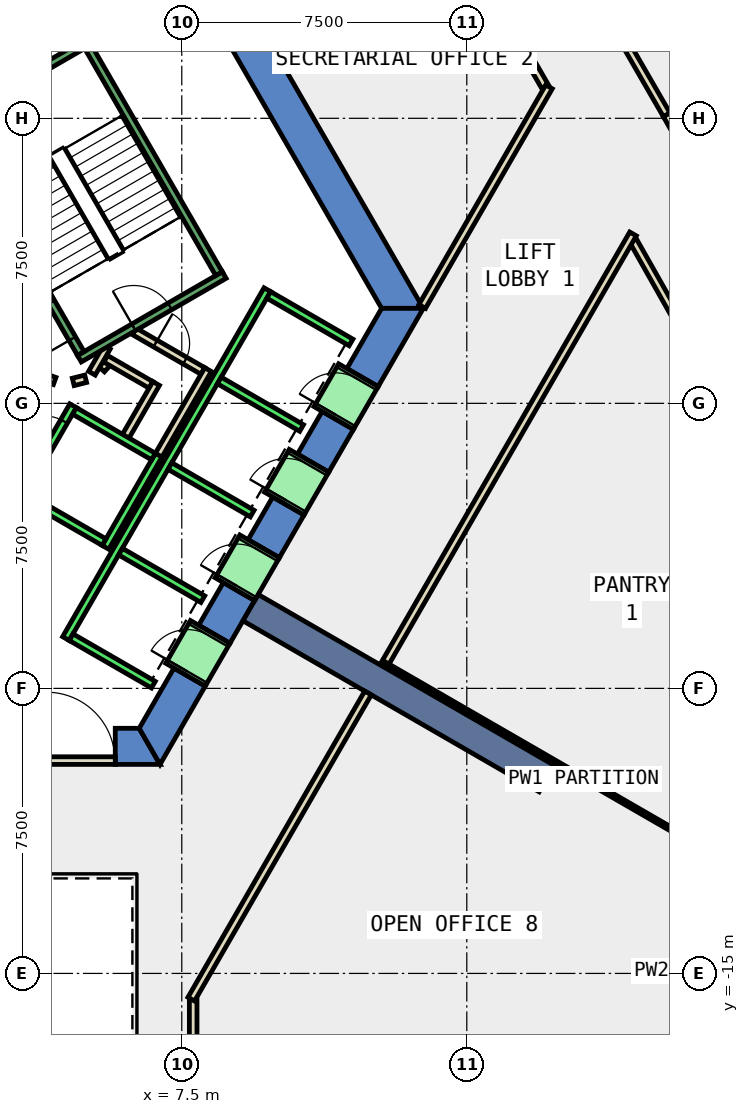
"""IFC4 building model, lengths in metres.
Left out: names, types, materials, properties, quantities, classifications, styles, units other than length and angle.
Written with IfcOpenShell. Run it as: python <this file> out.ifc"""

import sys

from ifc_helpers import new_model, si_unit, direction, frame, frame_2d, origin, place, context, subcontext, project, spatial, polyline, rectangle, outline, extrude, element, fill, save


model = new_model("IFC4")
c1 = context("Model", 3, precision=1e-05, world=origin(), true_north=direction((0.0, 1.0)))
c2 = subcontext(c1, "Body", "Model", "MODEL_VIEW")
j1 = project(units=[si_unit("LENGTHUNIT", "METRE"), si_unit("PLANEANGLEUNIT", "RADIAN")], contexts=[c1])
p1 = place(None, origin())
s1 = spatial("IfcSite", under=j1, at=p1, CompositionType="ELEMENT")
p2 = place(p1, origin())
s2 = spatial("IfcBuilding", under=s1, at=p2, CompositionType="ELEMENT")
p3 = place(p2, frame((0.0, 0.0, 77.0)))
s3 = spatial("IfcBuildingStorey", under=s2, at=p3, CompositionType="ELEMENT", Elevation=77.0)
p4 = place(p3, frame((0.0, 0.0, -0.4)))
e1 = element("IfcWall", 1, at=p4, inside=s3, PredefinedType="SHEAR", context=c2, shape_type="SweptSolid", body=[
    extrude(outline(polyline([(8.517, 11.748), (7.694, 11.273), (12.759, 2.5), (13.856, 2.5), (8.517, 11.748)])), origin(), (0.0, 0.0, 1.0), 4.0),
])
p5 = place(p3, frame((0.0, 0.0, -0.4)))
e2 = element("IfcWall", 2, at=p5, inside=s3, PredefinedType="SHEAR", context=c2, shape_type="SweptSolid", body=[
    extrude(outline(polyline([(5.75, -8.55), (5.75, -9.5), (6.928, -9.5), (6.38, -8.55), (5.75, -8.55)])), origin(), (0.0, 0.0, 1.0), 4.0),
])
p6 = place(p3, frame((0.0, 0.0, -0.4)))
e3 = element("IfcWall", 3, at=p6, inside=s3, PredefinedType="SHEAR", context=c2, shape_type="SweptSolid", body=[
    extrude(outline(polyline([(8.117, -7.44), (7.295, -6.965), (6.38, -8.55), (6.928, -9.5), (8.117, -7.44)])), origin(), (0.0, 0.0, 1.0), 4.0),
])
p7 = place(p3, frame((0.0, 0.0, -0.4)))
e4 = element("IfcWall", 4, at=p7, inside=s3, PredefinedType="SHEAR", context=c2, shape_type="SweptSolid", body=[
    extrude(outline(polyline([(9.417, -5.189), (8.594, -4.714), (7.945, -5.839), (8.767, -6.314), (9.417, -5.189)])), origin(), (0.0, 0.0, 1.0), 4.0),
])
p8 = place(p3, frame((0.0, 0.0, -0.4)))
e5 = element("IfcWall", 5, at=p8, inside=s3, PredefinedType="SHEAR", context=c2, shape_type="SweptSolid", body=[
    extrude(outline(polyline([(10.717, -2.937), (9.894, -2.462), (9.244, -3.588), (10.067, -4.063), (10.717, -2.937)])), origin(), (0.0, 0.0, 1.0), 4.0),
])
p9 = place(p3, frame((0.0, 0.0, -0.4)))
e6 = element("IfcWall", 6, at=p9, inside=s3, PredefinedType="SHEAR", context=c2, shape_type="SweptSolid", body=[
    extrude(outline(polyline([(12.017, -0.686), (11.194, -0.211), (10.544, -1.336), (11.367, -1.811), (12.017, -0.686)])), origin(), (0.0, 0.0, 1.0), 4.0),
])
p10 = place(p3, frame((0.0, 0.0, -0.4)))
e7 = element("IfcWall", 7, at=p10, inside=s3, PredefinedType="SHEAR", context=c2, shape_type="SweptSolid", body=[
    extrude(outline(polyline([(11.844, 0.915), (12.667, 0.44), (13.856, 2.5), (12.759, 2.5), (11.844, 0.915)])), origin(), (0.0, 0.0, 1.0), 4.0),
])
p11 = place(p3, frame((9.31, -5.375, -0.4), z_axis=(0.0, 0.0, 1.0), x_axis=(0.866017533419, -0.500013631625, 0.0)))
e8 = element("IfcWall", 8, at=p11, inside=s3, PredefinedType="SHEAR", context=c2, shape_type="SweptSolid", body=[
    extrude(rectangle(XDim=9.0, YDim=0.8, at=frame_2d((4.5, 0.0))), origin(), (0.0, 0.0, 1.0), 4.0),
])
p12 = place(p3, frame((17.063, 8.328, 0.0), z_axis=(0.0, 0.0, 1.0), x_axis=(-0.499986575203, 0.866033154456, 0.0)))
e9 = element("IfcWall", 9, at=p12, inside=s3, PredefinedType="PARTITIONING", context=c2, shape_type="SweptSolid", body=[
    extrude(rectangle(XDim=4.934, YDim=0.2, at=frame_2d((2.467, 0.0))), origin(), (0.0, 0.0, 1.0), 3.6),
])
p13 = place(p3, frame((21.77, 0.046, 0.0), z_axis=(0.0, 0.0, 1.0), x_axis=(-0.492148137455, 0.870511465059, 0.0)))
e10 = element("IfcWall", 10, at=p13, inside=s3, PredefinedType="PARTITIONING", context=c2, shape_type="SweptSolid", body=[
    extrude(rectangle(XDim=4.868, YDim=0.2, at=frame_2d((2.434, 0.0))), origin(), (0.0, 0.0, 1.0), 3.6),
])
p14 = place(p3, frame((20.259, 7.596, 0.0), z_axis=(0.0, 0.0, 1.0), x_axis=(0.492021755503, -0.870582903641, 0.0)))
e11 = element("IfcWall", 11, at=p14, inside=s3, PredefinedType="PARTITIONING", context=c2, shape_type="SweptSolid", body=[
    extrude(rectangle(XDim=7.251, YDim=0.2, at=frame_2d((3.626, 0.0))), origin(), (0.0, 0.0, 1.0), 3.6),
])
p15 = place(p14, frame((3.201, 0.0, 0.0)))
e12 = element("IfcOpeningElement", 12, at=p15, cuts=e11, PredefinedType="OPENING", context=c2, shape_type="SweptSolid", body=[
    extrude(rectangle(XDim=1.0, YDim=2.1, at=frame_2d((0.5, 1.05))), frame((0.0, 0.11, 0.0), z_axis=(0.0, -1.0, 0.0), x_axis=(1.0, 0.0, 0.0)), (0.0, 0.0, 1.0), 0.22),
])
p16 = place(p3, frame((16.669, 13.811, 0.0), z_axis=(0.0, 0.0, 1.0), x_axis=(0.500027672765, -0.866009426316, 0.0)))
e13 = element("IfcWall", 13, at=p16, inside=s3, PredefinedType="PARTITIONING", context=c2, shape_type="SweptSolid", body=[
    extrude(rectangle(XDim=7.178, YDim=0.2, at=frame_2d((3.589, 0.0))), origin(), (0.0, 0.0, 1.0), 3.6),
])
p17 = place(p16, frame((3.164, 0.0, 0.0)))
e14 = element("IfcOpeningElement", 14, at=p17, cuts=e13, PredefinedType="OPENING", context=c2, shape_type="SweptSolid", body=[
    extrude(rectangle(XDim=1.0, YDim=2.1, at=frame_2d((0.5, 1.05))), frame((0.0, 0.11, 0.0), z_axis=(0.0, -1.0, 0.0), x_axis=(1.0, 0.0, 0.0)), (0.0, 0.0, 1.0), 0.22),
])
p18 = place(p3, frame((5.39, 0.898, 0.0), z_axis=(0.0, 0.0, 1.0), x_axis=(0.673828488714, 0.738887791073, 0.0)))
e15 = element("IfcWall", 15, at=p18, inside=s3, PredefinedType="PARTITIONING", context=c2, shape_type="SweptSolid", body=[
    extrude(rectangle(XDim=0.263, YDim=0.2, at=frame_2d((0.131, 0.0))), origin(), (0.0, 0.0, 1.0), 3.6),
])
p19 = place(p3, frame((5.499, 1.172, 0.0), z_axis=(0.0, 0.0, 1.0), x_axis=(0.866333505267, -0.499465972466, 0.0)))
e16 = element("IfcWall", 16, at=p19, inside=s3, PredefinedType="PARTITIONING", context=c2, shape_type="SweptSolid", body=[
    extrude(rectangle(XDim=1.374, YDim=0.2, at=frame_2d((0.687, 0.0))), origin(), (0.0, 0.0, 1.0), 3.6),
])
p20 = place(p3, frame((6.826, 0.522, 0.0), z_axis=(0.0, 0.0, 1.0), x_axis=(-0.500016722714, -0.866015748706, 0.0)))
e17 = element("IfcWall", 17, at=p20, inside=s3, PredefinedType="PARTITIONING", context=c2, shape_type="SweptSolid", body=[
    extrude(rectangle(XDim=1.7, YDim=0.2, at=frame_2d((0.85, 0.0))), origin(), (0.0, 0.0, 1.0), 3.6),
])
p21 = place(p3, frame((6.25, 1.894, 0.0), z_axis=(0.0, 0.0, 1.0), x_axis=(0.866043184279, -0.499969202016, 0.0)))
e18 = element("IfcWall", 18, at=p21, inside=s3, PredefinedType="PARTITIONING", context=c2, shape_type="SweptSolid", body=[
    extrude(rectangle(XDim=2.084, YDim=0.2, at=frame_2d((1.042, 0.0))), origin(), (0.0, 0.0, 1.0), 3.6),
])
p22 = place(p21, frame((0.642, 0.0, 0.0)))
e19 = element("IfcOpeningElement", 19, at=p22, cuts=e18, PredefinedType="OPENING", context=c2, shape_type="SweptSolid", body=[
    extrude(rectangle(XDim=0.9, YDim=2.1, at=frame_2d((0.45, 1.05))), frame((0.0, 0.11, 0.0), z_axis=(0.0, -1.0, 0.0), x_axis=(1.0, 0.0, 0.0)), (0.0, 0.0, 1.0), 0.22),
])
p23 = place(p3, frame((8.192, 0.888, 0.0), z_axis=(0.0, 0.0, 1.0), x_axis=(-0.499940625693, -0.866059680843, 0.0)))
e20 = element("IfcWall", 20, at=p23, inside=s3, PredefinedType="PARTITIONING", context=c2, shape_type="SweptSolid", body=[
    extrude(rectangle(XDim=2.68, YDim=0.2, at=frame_2d((1.34, 0.0))), origin(), (0.0, 0.0, 1.0), 3.6),
])
p24 = place(p3, frame((5.135, 0.793, 0.0), z_axis=(0.0, 0.0, 1.0), x_axis=(0.499526442893, 0.866298639529, 0.0)))
e21 = element("IfcWall", 21, at=p24, inside=s3, PredefinedType="PARTITIONING", context=c2, shape_type="SweptSolid", body=[
    extrude(rectangle(XDim=0.791, YDim=0.2, at=frame_2d((0.396, 0.0))), origin(), (0.0, 0.0, 1.0), 3.6),
])
p25 = place(p3, frame((13.827, 2.55, 0.0), z_axis=(0.0, 0.0, 1.0), x_axis=(0.500039204794, 0.866002767703, 0.0)))
e22 = element("IfcWall", 22, at=p25, inside=s3, PredefinedType="PARTITIONING", context=c2, shape_type="SweptSolid", body=[
    extrude(rectangle(XDim=6.672, YDim=0.2, at=frame_2d((3.336, 0.0))), origin(), (0.0, 0.0, 1.0), 3.6),
])
p26 = place(p3, frame((3.838, 0.702, 0.0), z_axis=(0.0, 0.0, 1.0), x_axis=(0.941035081519, -0.338308993895, 0.0)))
e23 = element("IfcWall", 23, at=p26, inside=s3, PredefinedType="PARTITIONING", context=c2, shape_type="SweptSolid", body=[
    extrude(rectangle(XDim=0.337, YDim=0.2, at=frame_2d((0.168, 0.0))), origin(), (0.0, 0.0, 1.0), 3.6),
])
p27 = place(p3, frame((4.644, 0.564, 0.0), z_axis=(0.0, 0.0, 1.0), x_axis=(0.969929076366, 0.243387729394, 0.0)))
e24 = element("IfcWall", 24, at=p27, inside=s3, PredefinedType="PARTITIONING", context=c2, shape_type="SweptSolid", body=[
    extrude(rectangle(XDim=0.337, YDim=0.2, at=frame_2d((0.168, 0.0))), origin(), (0.0, 0.0, 1.0), 3.6),
])
p28 = place(p3, frame((7.8, -15.69, 0.0), z_axis=(0.0, 0.0, 1.0), x_axis=(0.0, -1.0, 0.0)))
e25 = element("IfcWall", 25, at=p28, inside=s3, PredefinedType="PARTITIONING", context=c2, shape_type="SweptSolid", body=[
    extrude(rectangle(XDim=3.121, YDim=0.2, at=frame_2d((1.561, 0.0))), origin(), (0.0, 0.0, 1.0), 3.6),
])
p29 = place(p3, frame((12.4, -7.621, 0.0), z_axis=(0.0, 0.0, 1.0), x_axis=(-0.49990497871, -0.866080257402, 0.0)))
e26 = element("IfcWall", 26, at=p29, inside=s3, PredefinedType="PARTITIONING", context=c2, shape_type="SweptSolid", body=[
    extrude(rectangle(XDim=9.302, YDim=0.2, at=frame_2d((4.651, 0.0))), origin(), (0.0, 0.0, 1.0), 3.6),
])
p30 = place(p3, frame((19.374, 4.458, 0.0), z_axis=(0.0, 0.0, 1.0), x_axis=(-0.499973880856, -0.866040483154, 0.0)))
e27 = element("IfcWall", 27, at=p30, inside=s3, PredefinedType="PARTITIONING", context=c2, shape_type="SweptSolid", body=[
    extrude(rectangle(XDim=13.113, YDim=0.2, at=frame_2d((6.556, 0.0))), origin(), (0.0, 0.0, 1.0), 3.6),
])
p31 = place(p3, frame((12.843, -6.855, 0.0), z_axis=(0.0, 0.0, 1.0), x_axis=(0.866054959007, -0.499948805358, 0.0)))
e28 = element("IfcWall", 28, at=p31, inside=s3, PredefinedType="PARTITIONING", context=c2, shape_type="SweptSolid", body=[
    extrude(rectangle(XDim=12.075, YDim=0.1, at=frame_2d((6.038, 0.0))), origin(), (0.0, 0.0, 1.0), 3.6),
])
p32 = place(p3, frame((22.969, -13.316, 0.0), z_axis=(0.0, 0.0, 1.0), x_axis=(-0.500007312183, -0.866021182053, 0.0)))
e29 = element("IfcWall", 29, at=p32, inside=s3, PredefinedType="PARTITIONING", context=c2, shape_type="SweptSolid", body=[
    extrude(rectangle(XDim=6.306, YDim=0.15, at=frame_2d((3.153, 0.0))), origin(), (0.0, 0.0, 1.0), 3.6),
])
p33 = place(p3, frame((3.75, -9.4, 0.0), z_axis=(0.0, 0.0, 1.0), x_axis=(1.0, 0.0, 0.0)))
e30 = element("IfcWall", 30, at=p33, inside=s3, PredefinedType="PARTITIONING", context=c2, shape_type="SweptSolid", body=[
    extrude(rectangle(XDim=2.0, YDim=0.2, at=frame_2d((1.0, 0.0))), origin(), (0.0, 0.0, 1.0), 2.4),
])
p34 = place(p33, frame((0.19, 0.0, 0.0)))
e31 = element("IfcOpeningElement", 31, at=p34, cuts=e30, PredefinedType="OPENING", context=c2, shape_type="SweptSolid", body=[
    extrude(rectangle(XDim=1.8, YDim=2.1, at=frame_2d((0.9, 1.05))), frame((0.0, 0.11, 0.0), z_axis=(0.0, -1.0, 0.0), x_axis=(1.0, 0.0, 0.0)), (0.0, 0.0, 1.0), 0.22),
])
p35 = place(p3, frame((3.24, -2.488, 0.0), z_axis=(0.0, 0.0, 1.0), x_axis=(0.49994636267, 0.866056369097, 0.0)))
e32 = element("IfcWall", 32, at=p35, inside=s3, PredefinedType="STANDARD", context=c2, shape_type="SweptSolid", body=[
    extrude(rectangle(XDim=2.8, YDim=0.2, at=frame_2d((1.4, 0.0))), origin(), (0.0, 0.0, 1.0), 3.6),
])
p36 = place(p35, frame((1.225, 0.0, 0.0)))
e33 = element("IfcOpeningElement", 33, at=p36, cuts=e32, PredefinedType="OPENING", context=c2, shape_type="SweptSolid", body=[
    extrude(rectangle(XDim=1.1, YDim=2.1, at=frame_2d((0.55, 1.05))), frame((0.0, 0.11, 0.0), z_axis=(0.0, -1.0, 0.0), x_axis=(1.0, 0.0, 0.0)), (0.0, 0.0, 1.0), 0.22),
])
p37 = place(p3, frame((5.492, -3.788, 0.0), z_axis=(0.0, 0.0, 1.0), x_axis=(0.500011755427, 0.866018616679, 0.0)))
e34 = element("IfcWall", 34, at=p37, inside=s3, PredefinedType="STANDARD", context=c2, shape_type="SweptSolid", body=[
    extrude(rectangle(XDim=2.8, YDim=0.2, at=frame_2d((1.4, 0.0))), origin(), (0.0, 0.0, 1.0), 3.6),
])
p38 = place(p3, frame((3.377, -2.452, 0.0), z_axis=(0.0, 0.0, 1.0), x_axis=(0.865955154139, -0.50012165622, 0.0)))
e35 = element("IfcWall", 35, at=p38, inside=s3, PredefinedType="STANDARD", context=c2, shape_type="SweptSolid", body=[
    extrude(rectangle(XDim=2.4, YDim=0.2, at=frame_2d((1.2, 0.0))), origin(), (0.0, 0.0, 1.0), 3.6),
])
p39 = place(p3, frame((4.677, -0.2, 0.0), z_axis=(0.0, 0.0, 1.0), x_axis=(0.865973769406, -0.500089422704, 0.0)))
e36 = element("IfcWall", 36, at=p39, inside=s3, PredefinedType="STANDARD", context=c2, shape_type="SweptSolid", body=[
    extrude(rectangle(XDim=2.399, YDim=0.2, at=frame_2d((1.2, 0.0))), origin(), (0.0, 0.0, 1.0), 3.6),
])
p40 = place(p3, frame((4.451, -6.19, 0.0), z_axis=(0.0, 0.0, 1.0), x_axis=(0.50000090737, 0.866024879913, 0.0)))
e37 = element("IfcWall", 37, at=p40, inside=s3, PredefinedType="STANDARD", context=c2, shape_type="SweptSolid", body=[
    extrude(rectangle(XDim=10.6, YDim=0.2, at=frame_2d((5.3, 0.0))), origin(), (0.0, 0.0, 1.0), 3.6),
])
for number, where, z_axis, x_axis in (
    (38, (4.588, -6.153, 0.0), (0.0, 0.0, 1.0), (0.866, -0.5, 0.0)),
    (39, (5.888, -3.902, 0.0), (0.0, 0.0, 1.0), (0.866, -0.5, 0.0)),
    (40, (7.188, -1.65, 0.0), (0.0, 0.0, 1.0), (0.866, -0.5, 0.0)),
    (41, (8.488, 0.602, 0.0), (0.0, 0.0, 1.0), (0.866, -0.5, 0.0)),
):
    element("IfcWall", number, at=place(p3, frame(where, z_axis=z_axis, x_axis=x_axis)), inside=s3, PredefinedType="STANDARD", context=c2, shape_type="SweptSolid", body=[
        extrude(rectangle(XDim=2.5, YDim=0.2, at=frame_2d((1.25, 0.0))), origin(), (0.0, 0.0, 1.0), 3.6),
    ])
p41 = place(p3, frame((9.788, 2.853, 0.0), z_axis=(0.0, 0.0, 1.0), x_axis=(0.865998541277, -0.500046524342, 0.0)))
e42 = element("IfcWall", 42, at=p41, inside=s3, PredefinedType="STANDARD", context=c2, shape_type="SweptSolid", body=[
    extrude(rectangle(XDim=2.5, YDim=0.2, at=frame_2d((1.25, 0.0))), origin(), (0.0, 0.0, 1.0), 3.6),
])
p42 = place(p3, frame((7.598, -7.14, 0.0), z_axis=(0.0, 0.0, 1.0), x_axis=(0.500362116554, 0.865816234728, 0.0)))
e43 = element("IfcWall", 43, at=p42, inside=s3, PredefinedType="STANDARD", context=c2, shape_type="SweptSolid", body=[
    extrude(rectangle(XDim=1.299, YDim=1.2, at=frame_2d((0.65, 0.0))), origin(), (0.0, 0.0, 1.0), 2.4),
])
p43 = place(p42, frame((0.1, 0.0, 0.0)))
e44 = element("IfcOpeningElement", 44, at=p43, cuts=e43, PredefinedType="OPENING", context=c2, shape_type="SweptSolid", body=[
    extrude(rectangle(XDim=1.1, YDim=2.3, at=frame_2d((0.55, 1.15))), frame((0.0, 0.61, 0.0), z_axis=(0.0, -1.0, 0.0), x_axis=(1.0, 0.0, 0.0)), (0.0, 0.0, 1.0), 1.22),
])
p44 = place(p3, frame((8.898, -4.889, 0.0), z_axis=(0.0, 0.0, 1.0), x_axis=(0.500036693733, 0.866004217611, 0.0)))
e45 = element("IfcWall", 45, at=p44, inside=s3, PredefinedType="STANDARD", context=c2, shape_type="SweptSolid", body=[
    extrude(rectangle(XDim=1.3, YDim=1.2, at=frame_2d((0.65, 0.0))), origin(), (0.0, 0.0, 1.0), 2.4),
])
p45 = place(p44, frame((0.1, 0.0, 0.0)))
e46 = element("IfcOpeningElement", 46, at=p45, cuts=e45, PredefinedType="OPENING", context=c2, shape_type="SweptSolid", body=[
    extrude(rectangle(XDim=1.1, YDim=2.3, at=frame_2d((0.55, 1.15))), frame((0.0, 0.61, 0.0), z_axis=(0.0, -1.0, 0.0), x_axis=(1.0, 0.0, 0.0)), (0.0, 0.0, 1.0), 1.22),
])
p46 = place(p3, frame((10.198, -2.637, 0.0), z_axis=(0.0, 0.0, 1.0), x_axis=(0.49989585183, 0.866085525409, 0.0)))
e47 = element("IfcWall", 47, at=p46, inside=s3, PredefinedType="STANDARD", context=c2, shape_type="SweptSolid", body=[
    extrude(rectangle(XDim=1.3, YDim=1.2, at=frame_2d((0.65, 0.0))), origin(), (0.0, 0.0, 1.0), 2.4),
])
p47 = place(p46, frame((0.1, 0.0, 0.0)))
e48 = element("IfcOpeningElement", 48, at=p47, cuts=e47, PredefinedType="OPENING", context=c2, shape_type="SweptSolid", body=[
    extrude(rectangle(XDim=1.1, YDim=2.3, at=frame_2d((0.55, 1.15))), frame((0.0, 0.61, 0.0), z_axis=(0.0, -1.0, 0.0), x_axis=(1.0, 0.0, 0.0)), (0.0, 0.0, 1.0), 1.22),
])
p48 = place(p3, frame((11.498, -0.385, 0.0), z_axis=(0.0, 0.0, 1.0), x_axis=(0.500221244143, 0.865897630733, 0.0)))
e49 = element("IfcWall", 49, at=p48, inside=s3, PredefinedType="STANDARD", context=c2, shape_type="SweptSolid", body=[
    extrude(rectangle(XDim=1.299, YDim=1.2, at=frame_2d((0.65, 0.0))), origin(), (0.0, 0.0, 1.0), 2.4),
])
p49 = place(p48, frame((0.1, 0.0, 0.0)))
e50 = element("IfcOpeningElement", 50, at=p49, cuts=e49, PredefinedType="OPENING", context=c2, shape_type="SweptSolid", body=[
    extrude(rectangle(XDim=1.1, YDim=2.3, at=frame_2d((0.55, 1.15))), frame((0.0, 0.61, 0.0), z_axis=(0.0, -1.0, 0.0), x_axis=(1.0, 0.0, 0.0)), (0.0, 0.0, 1.0), 1.22),
])
p50 = place(p3, frame((4.806, 1.176, 0.0), z_axis=(0.0, 0.0, 1.0), x_axis=(0.866059941101, 0.499940174841, 0.0)))
e51 = element("IfcWall", 51, at=p50, inside=s3, PredefinedType="STANDARD", context=c2, shape_type="SweptSolid", body=[
    extrude(rectangle(XDim=4.4, YDim=0.2, at=frame_2d((2.2, 0.0))), origin(), (0.0, 0.0, 1.0), 3.6),
])
p51 = place(p50, frame((1.65, 0.0, 0.0)))
e52 = element("IfcOpeningElement", 52, at=p51, cuts=e51, PredefinedType="OPENING", context=c2, shape_type="SweptSolid", body=[
    extrude(rectangle(XDim=1.1, YDim=2.2, at=frame_2d((0.55, 1.1))), frame((0.0, 0.11, 0.0), z_axis=(0.0, -1.0, 0.0), x_axis=(1.0, 0.0, 0.0)), (0.0, 0.0, 1.0), 0.22),
])
p52 = place(p3, frame((1.256, 7.324, 0.0), z_axis=(0.0, 0.0, 1.0), x_axis=(0.866046073146, 0.499964197906, 0.0)))
e53 = element("IfcWall", 53, at=p52, inside=s3, PredefinedType="STANDARD", context=c2, shape_type="SweptSolid", body=[
    extrude(rectangle(XDim=4.4, YDim=0.2, at=frame_2d((2.2, 0.0))), origin(), (0.0, 0.0, 1.0), 3.6),
])
p53 = place(p3, frame((4.843, 1.312, 0.0), z_axis=(0.0, 0.0, 1.0), x_axis=(-0.499963383562, 0.866046543262, 0.0)))
e54 = element("IfcWall", 54, at=p53, inside=s3, PredefinedType="STANDARD", context=c2, shape_type="SweptSolid", body=[
    extrude(rectangle(XDim=6.9, YDim=0.2, at=frame_2d((3.45, 0.0))), origin(), (0.0, 0.0, 1.0), 3.6),
])
p54 = place(p53, frame((0.45, 0.0, 0.0)))
e55 = element("IfcOpeningElement", 55, at=p54, cuts=e54, PredefinedType="OPENING", context=c2, shape_type="SweptSolid", body=[
    extrude(rectangle(XDim=1.1, YDim=2.2, at=frame_2d((0.55, 1.1))), frame((0.0, 0.11, 0.0), z_axis=(0.0, -1.0, 0.0), x_axis=(1.0, 0.0, 0.0)), (0.0, 0.0, 1.0), 0.22),
])
p55 = place(p3, frame((8.48, 3.412, 0.0), z_axis=(0.0, 0.0, 1.0), x_axis=(-0.499978703459, 0.866037698999, 0.0)))
e56 = element("IfcWall", 56, at=p55, inside=s3, PredefinedType="STANDARD", context=c2, shape_type="SweptSolid", body=[
    extrude(rectangle(XDim=6.9, YDim=0.2, at=frame_2d((3.45, 0.0))), origin(), (0.0, 0.0, 1.0), 3.6),
])
p56 = place(p22, origin())
e57 = element("IfcDoor", 57, at=p56, inside=s3, OperationType="SINGLE_SWING_LEFT", PredefinedType="DOOR", context=c2, shape_type="SweptSolid", body=[
    extrude(rectangle(XDim=0.9, YDim=2.1, at=frame_2d((0.45, 1.05))), frame((0.0, 0.025, 0.0), z_axis=(0.0, -1.0, 0.0), x_axis=(1.0, 0.0, 0.0)), (0.0, 0.0, 1.0), 0.05),
])
fill(e19, e57)
p57 = place(p34, origin())
e58 = element("IfcDoor", 58, at=p57, inside=s3, OperationType="DOUBLE_DOOR_SINGLE_SWING", PredefinedType="DOOR", context=c2, shape_type="SweptSolid", body=[
    extrude(rectangle(XDim=1.8, YDim=2.1, at=frame_2d((0.9, 1.05))), frame((0.0, 0.025, 0.0), z_axis=(0.0, -1.0, 0.0), x_axis=(1.0, 0.0, 0.0)), (0.0, 0.0, 1.0), 0.05),
])
fill(e31, e58)
p58 = place(p43, origin())
e59 = element("IfcDoor", 59, at=p58, inside=s3, OperationType="SLIDING_TO_LEFT", PredefinedType="DOOR", context=c2, shape_type="SweptSolid", body=[
    extrude(rectangle(XDim=1.1, YDim=2.3, at=frame_2d((0.55, 1.15))), frame((0.0, 0.025, 0.0), z_axis=(0.0, -1.0, 0.0), x_axis=(1.0, 0.0, 0.0)), (0.0, 0.0, 1.0), 0.05),
])
fill(e44, e59)
p59 = place(p45, origin())
e60 = element("IfcDoor", 60, at=p59, inside=s3, OperationType="SLIDING_TO_LEFT", PredefinedType="DOOR", context=c2, shape_type="SweptSolid", body=[
    extrude(rectangle(XDim=1.1, YDim=2.3, at=frame_2d((0.55, 1.15))), frame((0.0, 0.025, 0.0), z_axis=(0.0, -1.0, 0.0), x_axis=(1.0, 0.0, 0.0)), (0.0, 0.0, 1.0), 0.05),
])
fill(e46, e60)
p60 = place(p47, origin())
e61 = element("IfcDoor", 61, at=p60, inside=s3, OperationType="SLIDING_TO_LEFT", PredefinedType="DOOR", context=c2, shape_type="SweptSolid", body=[
    extrude(rectangle(XDim=1.1, YDim=2.3, at=frame_2d((0.55, 1.15))), frame((0.0, 0.025, 0.0), z_axis=(0.0, -1.0, 0.0), x_axis=(1.0, 0.0, 0.0)), (0.0, 0.0, 1.0), 0.05),
])
fill(e48, e61)
p61 = place(p49, origin())
e62 = element("IfcDoor", 62, at=p61, inside=s3, OperationType="SLIDING_TO_LEFT", PredefinedType="DOOR", context=c2, shape_type="SweptSolid", body=[
    extrude(rectangle(XDim=1.1, YDim=2.3, at=frame_2d((0.55, 1.15))), frame((0.0, 0.025, 0.0), z_axis=(0.0, -1.0, 0.0), x_axis=(1.0, 0.0, 0.0)), (0.0, 0.0, 1.0), 0.05),
])
fill(e50, e62)
p62 = place(p36, origin())
e63 = element("IfcDoor", 63, at=p62, inside=s3, OperationType="SLIDING_TO_LEFT", PredefinedType="DOOR", context=c2, shape_type="SweptSolid", body=[
    extrude(rectangle(XDim=1.1, YDim=2.1, at=frame_2d((0.55, 1.05))), frame((0.0, 0.025, 0.0), z_axis=(0.0, -1.0, 0.0), x_axis=(1.0, 0.0, 0.0)), (0.0, 0.0, 1.0), 0.05),
])
fill(e33, e63)
p63 = place(p54, origin())
e64 = element("IfcDoor", 64, at=p63, inside=s3, OperationType="SINGLE_SWING_LEFT", PredefinedType="DOOR", context=c2, shape_type="SweptSolid", body=[
    extrude(rectangle(XDim=1.1, YDim=2.2, at=frame_2d((0.55, 1.1))), frame((0.0, 0.025, 0.0), z_axis=(0.0, -1.0, 0.0), x_axis=(1.0, 0.0, 0.0)), (0.0, 0.0, 1.0), 0.05),
])
fill(e55, e64)
p64 = place(p51, origin())
e65 = element("IfcDoor", 65, at=p64, inside=s3, OperationType="SINGLE_SWING_LEFT", PredefinedType="DOOR", context=c2, shape_type="SweptSolid", body=[
    extrude(rectangle(XDim=1.1, YDim=2.2, at=frame_2d((0.55, 1.1))), frame((0.0, 0.025, 0.0), z_axis=(0.0, -1.0, 0.0), x_axis=(1.0, 0.0, 0.0)), (0.0, 0.0, 1.0), 0.05),
])
fill(e52, e65)
save(model, sys.argv[1])
